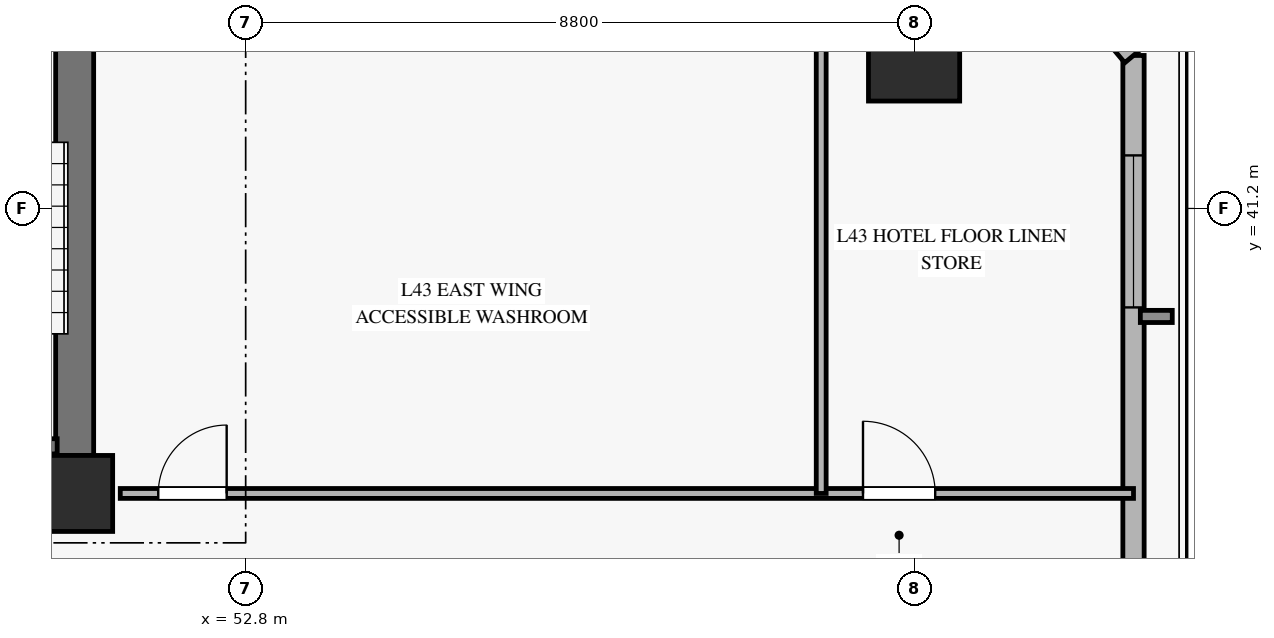
"""IFC4 building model, lengths in metres.
Left out: names, types, materials, properties, quantities, classifications, styles, units other than length and angle.
Written with IfcOpenShell. Run it as: python <this file> out.ifc"""

import sys

from ifc_helpers import new_model, si_unit, direction, frame, frame_2d, origin, origin_2d, place, context, subcontext, project, spatial, rectangle, hollow_rectangle, extrude, source, transform, mapped, element, fill, save


model = new_model("IFC4")
c1 = context("Model", 3, precision=1e-05, world=origin(), true_north=direction((0.0, 1.0)))
c2 = subcontext(c1, "Body", "Model", "MODEL_VIEW")
j1 = project(units=[si_unit("LENGTHUNIT", "METRE"), si_unit("PLANEANGLEUNIT", "RADIAN")], contexts=[c1])
p1 = place(None, origin())
s1 = spatial("IfcSite", under=j1, at=p1, CompositionType="ELEMENT")
p2 = place(p1, origin())
s2 = spatial("IfcBuilding", under=s1, at=p2, CompositionType="ELEMENT")
p3 = place(p2, frame((0.0, 0.0, 173.7)))
s3 = spatial("IfcBuildingStorey", under=s2, at=p3, CompositionType="ELEMENT", Elevation=173.7)
m1 = source(origin(), c2, "Body", "SweptSolid", [
    extrude(rectangle(XDim=1.0, YDim=1.0, at=origin_2d()), origin(), (0.0, 0.0, 1.0), 3.27),
])
p4 = place(p3, frame((50.55, 37.45, 0.0), z_axis=(0.0, 0.0, 1.0), x_axis=(1.0, 0.0, 0.0)))
e1 = element("IfcColumn", 1, at=p4, inside=s3, PredefinedType="PILASTER", context=c2, shape_type="MappedRepresentation", body=[
    mapped(m1, transform((0.0, 0.0, 0.0), x_axis=(1.0, 0.0, 0.0), y_axis=(0.0, 1.0, 0.0), z_axis=(0.0, 0.0, 1.0), scale=1.0)),
])
p5 = place(p3, frame((50.55, 37.95, 0.0), z_axis=(0.0, 0.0, 1.0), x_axis=(0.0, 1.0, 0.0)))
e2 = element("IfcWall", 2, at=p5, inside=s3, PredefinedType="SHEAR", context=c2, shape_type="SweptSolid", body=[
    extrude(rectangle(XDim=8.1, YDim=0.5, at=frame_2d((4.05, 0.0))), origin(), (0.0, 0.0, 1.0), 3.27),
])
m2 = source(origin(), c2, "Body", "SweptSolid", [
    extrude(hollow_rectangle(XDim=1.2, YDim=1.2, WallThickness=0.055, at=origin_2d()), origin(), (0.0, 0.0, 1.0), 3.27),
])
p6 = place(p3, frame((61.594, 43.213, 0.0), z_axis=(0.0, 0.0, 1.0), x_axis=(1.0, 0.0, 0.0)))
e3 = element("IfcColumn", 3, at=p6, inside=s3, PredefinedType="COLUMN", context=c2, shape_type="MappedRepresentation", body=[
    mapped(m2, transform((0.0, 0.0, 0.0), x_axis=(1.0, 0.0, 0.0), y_axis=(0.0, 1.0, 0.0), z_axis=(0.0, 0.0, 1.0), scale=1.0)),
])
p7 = place(p3, frame((64.481, 28.213, 0.0), z_axis=(0.0, 0.0, 1.0), x_axis=(0.0, 1.0, 0.0)))
e4 = element("IfcWall", 4, at=p7, inside=s3, PredefinedType="SOLIDWALL", context=c2, shape_type="SweptSolid", body=[
    extrude(rectangle(XDim=15.0, YDim=0.28, at=frame_2d((7.5, 0.0))), origin(), (0.0, 0.0, 1.0), 2.75),
])
p8 = place(p7, frame((1.271, 0.0, 0.45)))
e5 = element("IfcOpeningElement", 5, at=p8, cuts=e4, PredefinedType="OPENING", context=c2, shape_type="SweptSolid", body=[
    extrude(rectangle(XDim=2.0, YDim=2.0, at=frame_2d((1.0, 1.0))), frame((0.0, 0.15, 0.0), z_axis=(0.0, -1.0, 0.0), x_axis=(1.0, 0.0, 0.0)), (0.0, 0.0, 1.0), 0.3),
])
p9 = place(p7, frame((11.685, 0.0, 0.45)))
e6 = element("IfcOpeningElement", 6, at=p9, cuts=e4, PredefinedType="OPENING", context=c2, shape_type="SweptSolid", body=[
    extrude(rectangle(XDim=2.0, YDim=2.0, at=frame_2d((1.0, 1.0))), frame((0.0, 0.15, 0.0), z_axis=(0.0, -1.0, 0.0), x_axis=(1.0, 0.0, 0.0)), (0.0, 0.0, 1.0), 0.3),
])
p10 = place(p3, frame((64.481, 43.213, 0.0), z_axis=(0.0, 0.0, 1.0), x_axis=(-0.641069950716, 0.767482454711, 0.0)))
e7 = element("IfcWall", 7, at=p10, inside=s3, PredefinedType="SOLIDWALL", context=c2, shape_type="SweptSolid", body=[
    extrude(rectangle(XDim=3.957, YDim=0.3, at=frame_2d((1.979, 0.0))), origin(), (0.0, 0.0, 1.0), 2.75),
])
p11 = place(p10, frame((1.179, 0.0, 0.45)))
e8 = element("IfcOpeningElement", 8, at=p11, cuts=e7, PredefinedType="OPENING", context=c2, shape_type="SweptSolid", body=[
    extrude(rectangle(XDim=1.6, YDim=2.0, at=frame_2d((0.8, 1.0))), frame((0.0, 0.16, 0.0), z_axis=(0.0, -1.0, 0.0), x_axis=(1.0, 0.0, 0.0)), (0.0, 0.0, 1.0), 0.32),
])
p12 = place(p3, frame((47.44, 38.07, 0.0), z_axis=(0.0, 0.0, 1.0), x_axis=(1.0, 0.0, 0.0)))
e9 = element("IfcWall", 9, at=p12, inside=s3, PredefinedType="SOLIDWALL", context=c2, shape_type="SweptSolid", body=[
    extrude(rectangle(XDim=2.88, YDim=0.2, at=frame_2d((1.44, 0.0))), origin(), (0.0, 0.0, 1.0), 3.5),
])
p13 = place(p3, frame((51.15, 37.45, 0.0), z_axis=(0.0, 0.0, 1.0), x_axis=(1.0, 0.0, 0.0)))
e10 = element("IfcWall", 10, at=p13, inside=s3, PredefinedType="PARTITIONING", context=c2, shape_type="SweptSolid", body=[
    extrude(rectangle(XDim=13.331, YDim=0.13, at=frame_2d((6.666, 0.0))), origin(), (0.0, 0.0, 1.0), 2.755),
])
p14 = place(p13, frame((0.5, 0.0, 0.0)))
e11 = element("IfcOpeningElement", 11, at=p14, cuts=e10, PredefinedType="OPENING", context=c2, shape_type="SweptSolid", body=[
    extrude(rectangle(XDim=0.9, YDim=2.1, at=frame_2d((0.45, 1.05))), frame((0.0, 0.075, 0.0), z_axis=(0.0, -1.0, 0.0), x_axis=(1.0, 0.0, 0.0)), (0.0, 0.0, 1.0), 0.15),
])
p15 = place(p13, frame((9.772, 0.0, 0.0)))
e12 = element("IfcOpeningElement", 12, at=p15, cuts=e10, PredefinedType="OPENING", context=c2, shape_type="SweptSolid", body=[
    extrude(rectangle(XDim=0.95, YDim=2.1, at=frame_2d((0.475, 1.05))), frame((0.0, 0.075, 0.0), z_axis=(0.0, -1.0, 0.0), x_axis=(1.0, 0.0, 0.0)), (0.0, 0.0, 1.0), 0.15),
])
p16 = place(p3, frame((60.372, 37.45, 0.0), z_axis=(0.0, 0.0, 1.0), x_axis=(0.0, 1.0, 0.0)))
e13 = element("IfcWall", 13, at=p16, inside=s3, PredefinedType="PARTITIONING", context=c2, shape_type="SweptSolid", body=[
    extrude(rectangle(XDim=8.8, YDim=0.13, at=frame_2d((4.4, 0.0))), origin(), (0.0, 0.0, 1.0), 3.27),
])
m3 = source(origin(), c2, "Body", "SweptSolid", [
    extrude(rectangle(XDim=2.0, YDim=2.0, at=frame_2d((1.0, 1.0))), frame((0.0, 0.03, 0.0), z_axis=(0.0, -1.0, 0.0), x_axis=(1.0, 0.0, 0.0)), (0.0, 0.0, 1.0), 0.06),
])
p17 = place(p9, origin())
e14 = element("IfcWindow", 14, at=p17, inside=s3, PartitioningType="SINGLE_PANEL", PredefinedType="WINDOW", context=c2, shape_type="MappedRepresentation", body=[
    mapped(m3, transform((0.0, 0.0, 0.0), x_axis=(1.0, 0.0, 0.0), y_axis=(0.0, 1.0, 0.0), z_axis=(0.0, 0.0, 1.0), scale=1.0)),
])
fill(e6, e14)
m4 = source(origin(), c2, "Body", "SweptSolid", [
    extrude(rectangle(XDim=0.9, YDim=2.1, at=frame_2d((0.45, 1.05))), frame((0.0, 0.025, 0.0), z_axis=(0.0, -1.0, 0.0), x_axis=(1.0, 0.0, 0.0)), (0.0, 0.0, 1.0), 0.05),
])
p18 = place(p14, origin())
e15 = element("IfcDoor", 15, at=p18, inside=s3, OperationType="SINGLE_SWING_RIGHT", PredefinedType="DOOR", context=c2, shape_type="MappedRepresentation", body=[
    mapped(m4, transform((0.0, 0.0, 0.0), x_axis=(1.0, 0.0, 0.0), y_axis=(0.0, 1.0, 0.0), z_axis=(0.0, 0.0, 1.0), scale=1.0)),
])
fill(e11, e15)
m5 = source(origin(), c2, "Body", "SweptSolid", [
    extrude(rectangle(XDim=0.95, YDim=2.1, at=frame_2d((0.475, 1.05))), frame((0.0, 0.025, 0.0), z_axis=(0.0, -1.0, 0.0), x_axis=(1.0, 0.0, 0.0)), (0.0, 0.0, 1.0), 0.05),
])
p19 = place(p15, origin())
e16 = element("IfcDoor", 16, at=p19, inside=s3, OperationType="SINGLE_SWING_LEFT", PredefinedType="DOOR", context=c2, shape_type="MappedRepresentation", body=[
    mapped(m5, transform((0.0, 0.0, 0.0), x_axis=(1.0, 0.0, 0.0), y_axis=(0.0, 1.0, 0.0), z_axis=(0.0, 0.0, 1.0), scale=1.0)),
])
fill(e12, e16)
save(model, sys.argv[1])
